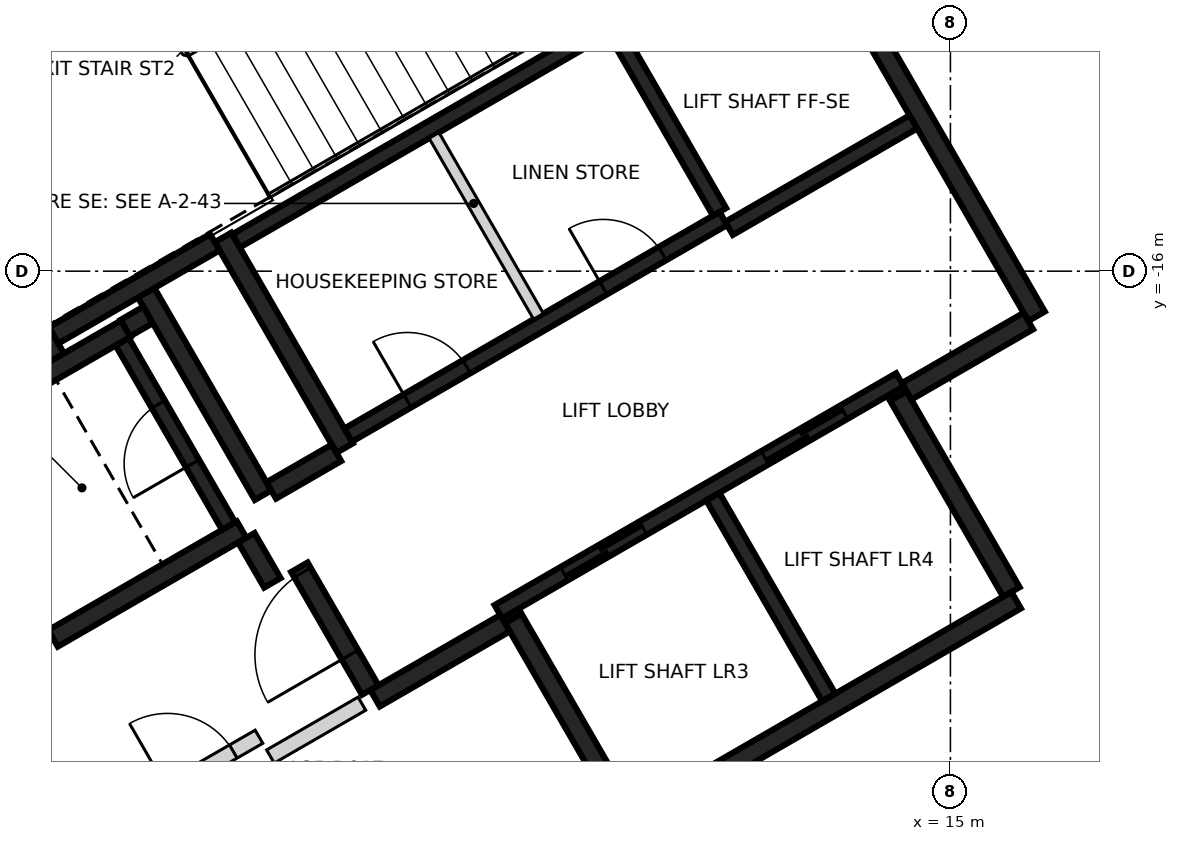
"""IFC4 building model, lengths in metres.
Left out: names, types, materials, properties, quantities, classifications, styles, units other than length and angle.
Written with IfcOpenShell. Run it as: python <this file> out.ifc"""

import sys

from ifc_helpers import new_model, si_unit, direction, frame, frame_2d, origin, place, context, subcontext, project, spatial, rectangle, extrude, element, fill, save


model = new_model("IFC4")
c1 = context("Model", 3, precision=1e-05, world=origin(), true_north=direction((0.0, 1.0)))
c2 = subcontext(c1, "Body", "Model", "MODEL_VIEW")
j1 = project(units=[si_unit("LENGTHUNIT", "METRE"), si_unit("PLANEANGLEUNIT", "RADIAN")], contexts=[c1])
p1 = place(None, origin())
s1 = spatial("IfcSite", under=j1, at=p1, CompositionType="ELEMENT")
p2 = place(p1, origin())
s2 = spatial("IfcBuilding", under=s1, at=p2, CompositionType="ELEMENT")
p3 = place(p2, frame((0.0, 0.0, 143.2)))
s3 = spatial("IfcBuildingStorey", under=s2, at=p3, CompositionType="ELEMENT", Elevation=143.2)
p4 = place(p3, frame((13.008, -11.181, 0.0), z_axis=(0.0, 0.0, 1.0), x_axis=(0.500004234368, -0.866022959057, 0.0)))
e1 = element("IfcWall", 1, at=p4, inside=s3, PredefinedType="SHEAR", context=c2, shape_type="SweptSolid", body=[
    extrude(rectangle(XDim=6.25, YDim=0.25, at=frame_2d((3.125, 0.0))), origin(), (0.0, 0.0, 1.0), 3.2),
])
p5 = place(p3, frame((15.865, -20.328, 0.0), z_axis=(0.0, 0.0, 1.0), x_axis=(-0.86602852612, -0.499994591916, 0.0)))
e2 = element("IfcWall", 2, at=p5, inside=s3, PredefinedType="SHEAR", context=c2, shape_type="SweptSolid", body=[
    extrude(rectangle(XDim=5.85, YDim=0.25, at=frame_2d((2.925, 0.0))), origin(), (0.0, 0.0, 1.0), 3.2),
])
p6 = place(p3, frame((3.235, -17.153, 0.0), z_axis=(0.0, 0.0, 1.0), x_axis=(-0.500008851346, 0.866020293397, 0.0)))
e3 = element("IfcWall", 3, at=p6, inside=s3, PredefinedType="SHEAR", context=c2, shape_type="SweptSolid", body=[
    extrude(rectangle(XDim=5.51, YDim=0.25, at=frame_2d((2.755, 0.0))), origin(), (0.0, 0.0, 1.0), 3.2),
])
p7 = place(p3, frame((7.031, -18.327, 0.0), z_axis=(0.0, 0.0, 1.0), x_axis=(-0.499971222258, 0.866042017984, 0.0)))
e4 = element("IfcWall", 4, at=p7, inside=s3, PredefinedType="SHEAR", context=c2, shape_type="SweptSolid", body=[
    extrude(rectangle(XDim=3.2, YDim=0.25, at=frame_2d((1.6, 0.0))), origin(), (0.0, 0.0, 1.0), 3.2),
])
for number, where, z_axis, x_axis in (
    (5, (14.315, -17.644, 0.0), (0.0, 0.0, 1.0), (0.5, -0.866, 0.0)),
    (6, (10.736, -23.145, 0.0), (0.0, 0.0, 1.0), (-0.5, 0.866, 0.0)),
):
    element("IfcWall", number, at=place(p3, frame(where, z_axis=z_axis, x_axis=x_axis)), inside=s3, PredefinedType="SHEAR", context=c2, shape_type="SweptSolid", body=[
        extrude(rectangle(XDim=2.974, YDim=0.25, at=frame_2d((1.487, 0.0))), origin(), (0.0, 0.0, 1.0), 3.2),
    ])
p8 = place(p3, frame((3.085, -20.894, 0.0), z_axis=(0.0, 0.0, 1.0), x_axis=(-0.499978833458, 0.866037623948, 0.0)))
e7 = element("IfcWall", 7, at=p8, inside=s3, PredefinedType="SHEAR", context=c2, shape_type="SweptSolid", body=[
    extrude(rectangle(XDim=3.05, YDim=0.25, at=frame_2d((1.525, 0.0))), origin(), (0.0, 0.0, 1.0), 3.2),
])
p9 = place(p3, frame((1.669, -18.19, 0.0), z_axis=(0.0, 0.0, 1.0), x_axis=(0.866042235819, 0.499970844928, 0.0)))
e8 = element("IfcWall", 8, at=p9, inside=s3, PredefinedType="SHEAR", context=c2, shape_type="SweptSolid", body=[
    extrude(rectangle(XDim=2.865, YDim=0.25, at=frame_2d((1.432, 0.0))), origin(), (0.0, 0.0, 1.0), 3.2),
])
p10 = place(p3, frame((5.675, -19.399, 0.0), z_axis=(0.0, 0.0, 1.0), x_axis=(-0.866026637627, -0.499997862916, 0.0)))
e9 = element("IfcWall", 9, at=p10, inside=s3, PredefinedType="SHEAR", context=c2, shape_type="SweptSolid", body=[
    extrude(rectangle(XDim=2.865, YDim=0.25, at=frame_2d((1.432, 0.0))), origin(), (0.0, 0.0, 1.0), 3.2),
])
p11 = place(p3, frame((4.414, -16.276, 0.0), z_axis=(0.0, 0.0, 1.0), x_axis=(0.500003324108, -0.866023484601, 0.0)))
e10 = element("IfcWall", 10, at=p11, inside=s3, PredefinedType="SHEAR", context=c2, shape_type="SweptSolid", body=[
    extrude(rectangle(XDim=3.085, YDim=0.25, at=frame_2d((1.542, 0.0))), origin(), (0.0, 0.0, 1.0), 3.2),
])
p12 = place(p3, frame((5.322, -15.619, 0.0), z_axis=(0.0, 0.0, 1.0), x_axis=(-0.866026229868, -0.499998569178, 0.0)))
e11 = element("IfcWall", 11, at=p12, inside=s3, PredefinedType="SHEAR", context=c2, shape_type="SweptSolid", body=[
    extrude(rectangle(XDim=2.449, YDim=0.25, at=frame_2d((1.225, 0.0))), origin(), (0.0, 0.0, 1.0), 3.2),
])
p13 = place(p3, frame((9.14, -20.631, 0.0), z_axis=(0.0, 0.0, 1.0), x_axis=(-0.866043531843, -0.499968599967, 0.0)))
e12 = element("IfcWall", 12, at=p13, inside=s3, PredefinedType="SHEAR", context=c2, shape_type="SweptSolid", body=[
    extrude(rectangle(XDim=1.975, YDim=0.25, at=frame_2d((0.987, 0.0))), origin(), (0.0, 0.0, 1.0), 3.2),
])
p14 = place(p3, frame((16.025, -16.656, 0.0), z_axis=(0.0, 0.0, 1.0), x_axis=(-0.866016279763, -0.500015802937, 0.0)))
e13 = element("IfcWall", 13, at=p14, inside=s3, PredefinedType="SHEAR", context=c2, shape_type="SweptSolid", body=[
    extrude(rectangle(XDim=1.849, YDim=0.25, at=frame_2d((0.925, 0.0))), origin(), (0.0, 0.0, 1.0), 3.2),
])
p15 = place(p3, frame((7.367, -21.51, 0.0), z_axis=(0.0, 0.0, 1.0), x_axis=(-0.499983108224, 0.866035156036, 0.0)))
e14 = element("IfcWall", 14, at=p15, inside=s3, PredefinedType="SHEAR", context=c2, shape_type="SweptSolid", body=[
    extrude(rectangle(XDim=1.865, YDim=0.25, at=frame_2d((0.932, 0.0))), origin(), (0.0, 0.0, 1.0), 3.2),
])
p16 = place(p15, frame((0.535, 0.0, 0.0)))
e15 = element("IfcOpeningElement", 15, at=p16, cuts=e14, PredefinedType="OPENING", context=c2, shape_type="SweptSolid", body=[
    extrude(rectangle(XDim=1.25, YDim=2.1, at=frame_2d((0.625, 1.05))), frame((0.0, 0.135, 0.0), z_axis=(0.0, -1.0, 0.0), x_axis=(1.0, 0.0, 0.0)), (0.0, 0.0, 1.0), 0.27),
])
p17 = place(p3, frame((6.065, -18.885, 0.0), z_axis=(0.0, 0.0, 1.0), x_axis=(0.866017078145, 0.500014420154, 0.0)))
e16 = element("IfcWall", 16, at=p17, inside=s3, PredefinedType="SHEAR", context=c2, shape_type="SweptSolid", body=[
    extrude(rectangle(XDim=0.989, YDim=0.25, at=frame_2d((0.495, 0.0))), origin(), (0.0, 0.0, 1.0), 3.2),
])
p18 = place(p3, frame((6.08, -20.1, 0.0), z_axis=(0.0, 0.0, 1.0), x_axis=(-0.500051773299, 0.865995510393, 0.0)))
e17 = element("IfcWall", 17, at=p18, inside=s3, PredefinedType="SHEAR", context=c2, shape_type="SweptSolid", body=[
    extrude(rectangle(XDim=0.685, YDim=0.25, at=frame_2d((0.342, 0.0))), origin(), (0.0, 0.0, 1.0), 3.2),
])
p19 = place(p3, frame((4.145, -16.749, 0.0), z_axis=(0.0, 0.0, 1.0), x_axis=(0.866185586049, 0.49972245349, 0.0)))
e18 = element("IfcWall", 18, at=p19, inside=s3, PredefinedType="SHEAR", context=c2, shape_type="SweptSolid", body=[
    extrude(rectangle(XDim=0.344, YDim=0.25, at=frame_2d((0.172, 0.0))), origin(), (0.0, 0.0, 1.0), 3.2),
])
p20 = place(p3, frame((9.052, -20.48, 0.0), z_axis=(0.0, 0.0, 1.0), x_axis=(0.866030299012, 0.499991521122, 0.0)))
e19 = element("IfcWall", 19, at=p20, inside=s3, PredefinedType="SHEAR", context=c2, shape_type="SweptSolid", body=[
    extrude(rectangle(XDim=6.1, YDim=0.2, at=frame_2d((3.05, 0.0))), origin(), (0.0, 0.0, 1.0), 3.2),
])
p21 = place(p20, frame((1.0, 0.0, 0.0)))
e20 = element("IfcOpeningElement", 20, at=p21, cuts=e19, PredefinedType="OPENING", context=c2, shape_type="SweptSolid", body=[
    extrude(rectangle(XDim=1.2, YDim=2.1, at=frame_2d((0.6, 1.05))), frame((0.0, 0.11, 0.0), z_axis=(0.0, -1.0, 0.0), x_axis=(1.0, 0.0, 0.0)), (0.0, 0.0, 1.0), 0.22),
])
p22 = place(p20, frame((4.05, 0.0, 0.0)))
e21 = element("IfcOpeningElement", 21, at=p22, cuts=e19, PredefinedType="OPENING", context=c2, shape_type="SweptSolid", body=[
    extrude(rectangle(XDim=1.2, YDim=2.1, at=frame_2d((0.6, 1.05))), frame((0.0, 0.11, 0.0), z_axis=(0.0, -1.0, 0.0), x_axis=(1.0, 0.0, 0.0)), (0.0, 0.0, 1.0), 0.22),
])
p23 = place(p3, frame((10.538, -12.752, 0.0), z_axis=(0.0, 0.0, 1.0), x_axis=(-0.866038630372, -0.499977090179, 0.0)))
e22 = element("IfcWall", 22, at=p23, inside=s3, PredefinedType="SHEAR", context=c2, shape_type="SweptSolid", body=[
    extrude(rectangle(XDim=5.699, YDim=0.2, at=frame_2d((2.85, 0.0))), origin(), (0.0, 0.0, 1.0), 3.2),
])
p24 = place(p3, frame((7.077, -18.156, 0.0), z_axis=(0.0, 0.0, 1.0), x_axis=(0.866038630372, 0.499977090179, 0.0)))
e23 = element("IfcWall", 23, at=p24, inside=s3, PredefinedType="SHEAR", context=c2, shape_type="SweptSolid", body=[
    extrude(rectangle(XDim=5.699, YDim=0.2, at=frame_2d((2.85, 0.0))), origin(), (0.0, 0.0, 1.0), 3.2),
])
p25 = place(p24, frame((0.899, 0.0, 0.0)))
e24 = element("IfcOpeningElement", 24, at=p25, cuts=e23, PredefinedType="OPENING", context=c2, shape_type="SweptSolid", body=[
    extrude(rectangle(XDim=0.9, YDim=2.1, at=frame_2d((0.45, 1.05))), frame((0.0, 0.11, 0.0), z_axis=(0.0, -1.0, 0.0), x_axis=(1.0, 0.0, 0.0)), (0.0, 0.0, 1.0), 0.22),
])
p26 = place(p24, frame((3.874, 0.0, 0.0)))
e25 = element("IfcOpeningElement", 25, at=p26, cuts=e23, PredefinedType="OPENING", context=c2, shape_type="SweptSolid", body=[
    extrude(rectangle(XDim=0.9, YDim=2.1, at=frame_2d((0.45, 1.05))), frame((0.0, 0.11, 0.0), z_axis=(0.0, -1.0, 0.0), x_axis=(1.0, 0.0, 0.0)), (0.0, 0.0, 1.0), 0.22),
])
p27 = place(p3, frame((11.875, -18.967, 0.0), z_axis=(0.0, 0.0, 1.0), x_axis=(0.49998131003, -0.866036194175, 0.0)))
e26 = element("IfcWall", 26, at=p27, inside=s3, PredefinedType="SHEAR", context=c2, shape_type="SweptSolid", body=[
    extrude(rectangle(XDim=3.048, YDim=0.2, at=frame_2d((1.524, 0.0))), origin(), (0.0, 0.0, 1.0), 3.2),
])
p28 = place(p3, frame((5.503, -19.352, 0.0), z_axis=(0.0, 0.0, 1.0), x_axis=(-0.499986818241, 0.866033014143, 0.0)))
e27 = element("IfcWall", 27, at=p28, inside=s3, PredefinedType="SHEAR", context=c2, shape_type="SweptSolid", body=[
    extrude(rectangle(XDim=2.798, YDim=0.2, at=frame_2d((1.399, 0.0))), origin(), (0.0, 0.0, 1.0), 3.2),
])
p29 = place(p28, frame((0.949, 0.0, 0.0)))
e28 = element("IfcOpeningElement", 28, at=p29, cuts=e27, PredefinedType="OPENING", context=c2, shape_type="SweptSolid", body=[
    extrude(rectangle(XDim=0.9, YDim=2.1, at=frame_2d((0.45, 1.05))), frame((0.0, 0.11, 0.0), z_axis=(0.0, -1.0, 0.0), x_axis=(1.0, 0.0, 0.0)), (0.0, 0.0, 1.0), 0.22),
])
p30 = place(p3, frame((11.963, -15.22, 0.0), z_axis=(0.0, 0.0, 1.0), x_axis=(-0.500034990121, 0.866005201286, 0.0)))
e29 = element("IfcWall", 29, at=p30, inside=s3, PredefinedType="SHEAR", context=c2, shape_type="SweptSolid", body=[
    extrude(rectangle(XDim=2.75, YDim=0.2, at=frame_2d((1.375, 0.0))), origin(), (0.0, 0.0, 1.0), 3.2),
])
p31 = place(p3, frame((14.512, -14.037, 0.0), z_axis=(0.0, 0.0, 1.0), x_axis=(-0.866044696403, -0.499966582715, 0.0)))
e30 = element("IfcWall", 30, at=p31, inside=s3, PredefinedType="SHEAR", context=c2, shape_type="SweptSolid", body=[
    extrude(rectangle(XDim=2.799, YDim=0.2, at=frame_2d((1.399, 0.0))), origin(), (0.0, 0.0, 1.0), 3.2),
])
p32 = place(p3, frame((8.207, -14.214, 0.0), z_axis=(0.0, 0.0, 1.0), x_axis=(0.50002746344, -0.86600954718, 0.0)))
e31 = element("IfcWall", 31, at=p32, inside=s3, PredefinedType="PARTITIONING", context=c2, shape_type="SweptSolid", body=[
    extrude(rectangle(XDim=2.748, YDim=0.15, at=frame_2d((1.374, 0.0))), origin(), (0.0, 0.0, 1.0), 3.2),
])
p33 = place(p3, frame((4.362, -23.012, 0.0), z_axis=(0.0, 0.0, 1.0), x_axis=(0.866692617793, 0.49884256661, 0.0)))
e32 = element("IfcWall", 32, at=p33, inside=s3, PredefinedType="PARTITIONING", context=c2, shape_type="SweptSolid", body=[
    extrude(rectangle(XDim=1.778, YDim=0.2, at=frame_2d((0.889, 0.0))), origin(), (0.0, 0.0, 1.0), 3.2),
])
p34 = place(p33, frame((0.389, 0.0, 0.0)))
e33 = element("IfcOpeningElement", 33, at=p34, cuts=e32, PredefinedType="OPENING", context=c2, shape_type="SweptSolid", body=[
    extrude(rectangle(XDim=1.0, YDim=2.1, at=frame_2d((0.5, 1.05))), frame((0.0, 0.11, 0.0), z_axis=(0.0, -1.0, 0.0), x_axis=(1.0, 0.0, 0.0)), (0.0, 0.0, 1.0), 0.22),
])
p35 = place(p3, frame((6.054, -22.385, 0.0), z_axis=(0.0, 0.0, 1.0), x_axis=(0.86593101922, 0.500163443238, 0.0)))
e34 = element("IfcWall", 34, at=p35, inside=s3, PredefinedType="PARTITIONING", context=c2, shape_type="SweptSolid", body=[
    extrude(rectangle(XDim=1.39, YDim=0.2, at=frame_2d((0.695, 0.0))), origin(), (0.0, 0.0, 1.0), 3.2),
])
p36 = place(p21, origin())
e35 = element("IfcDoor", 35, at=p36, inside=s3, OperationType="DOUBLE_DOOR_SLIDING", PredefinedType="DOOR", context=c2, shape_type="SweptSolid", body=[
    extrude(rectangle(XDim=1.2, YDim=2.1, at=frame_2d((0.6, 1.05))), frame((0.0, 0.025, 0.0), z_axis=(0.0, -1.0, 0.0), x_axis=(1.0, 0.0, 0.0)), (0.0, 0.0, 1.0), 0.05),
])
fill(e20, e35)
p37 = place(p22, origin())
e36 = element("IfcDoor", 36, at=p37, inside=s3, OperationType="DOUBLE_DOOR_SLIDING", PredefinedType="DOOR", context=c2, shape_type="SweptSolid", body=[
    extrude(rectangle(XDim=1.2, YDim=2.1, at=frame_2d((0.6, 1.05))), frame((0.0, 0.025, 0.0), z_axis=(0.0, -1.0, 0.0), x_axis=(1.0, 0.0, 0.0)), (0.0, 0.0, 1.0), 0.05),
])
fill(e21, e36)
p38 = place(p16, origin())
e37 = element("IfcDoor", 37, at=p38, inside=s3, OperationType="SINGLE_SWING_LEFT", PredefinedType="DOOR", context=c2, shape_type="SweptSolid", body=[
    extrude(rectangle(XDim=1.25, YDim=2.1, at=frame_2d((0.625, 1.05))), frame((0.0, 0.025, 0.0), z_axis=(0.0, -1.0, 0.0), x_axis=(1.0, 0.0, 0.0)), (0.0, 0.0, 1.0), 0.05),
])
fill(e15, e37)
p39 = place(p25, origin())
e38 = element("IfcDoor", 38, at=p39, inside=s3, OperationType="SINGLE_SWING_LEFT", PredefinedType="DOOR", context=c2, shape_type="SweptSolid", body=[
    extrude(rectangle(XDim=0.9, YDim=2.1, at=frame_2d((0.45, 1.05))), frame((0.0, 0.025, 0.0), z_axis=(0.0, -1.0, 0.0), x_axis=(1.0, 0.0, 0.0)), (0.0, 0.0, 1.0), 0.05),
])
fill(e24, e38)
p40 = place(p26, origin())
e39 = element("IfcDoor", 39, at=p40, inside=s3, OperationType="SINGLE_SWING_RIGHT", PredefinedType="DOOR", context=c2, shape_type="SweptSolid", body=[
    extrude(rectangle(XDim=0.9, YDim=2.1, at=frame_2d((0.45, 1.05))), frame((0.0, 0.025, 0.0), z_axis=(0.0, -1.0, 0.0), x_axis=(1.0, 0.0, 0.0)), (0.0, 0.0, 1.0), 0.05),
])
fill(e25, e39)
p41 = place(p29, origin())
e40 = element("IfcDoor", 40, at=p41, inside=s3, OperationType="SINGLE_SWING_LEFT", PredefinedType="DOOR", context=c2, shape_type="SweptSolid", body=[
    extrude(rectangle(XDim=0.9, YDim=2.1, at=frame_2d((0.45, 1.05))), frame((0.0, 0.025, 0.0), z_axis=(0.0, -1.0, 0.0), x_axis=(1.0, 0.0, 0.0)), (0.0, 0.0, 1.0), 0.05),
])
fill(e28, e40)
p42 = place(p34, frame((1.0, 0.0, 0.0), z_axis=(0.0, 0.0, 1.0), x_axis=(-1.0, 0.0, 0.0)))
e41 = element("IfcDoor", 41, at=p42, inside=s3, OperationType="SINGLE_SWING_LEFT", PredefinedType="DOOR", context=c2, shape_type="SweptSolid", body=[
    extrude(rectangle(XDim=1.0, YDim=2.1, at=frame_2d((0.5, 1.05))), frame((0.0, 0.025, 0.0), z_axis=(0.0, -1.0, 0.0), x_axis=(1.0, 0.0, 0.0)), (0.0, 0.0, 1.0), 0.05),
])
fill(e33, e41)
save(model, sys.argv[1])
